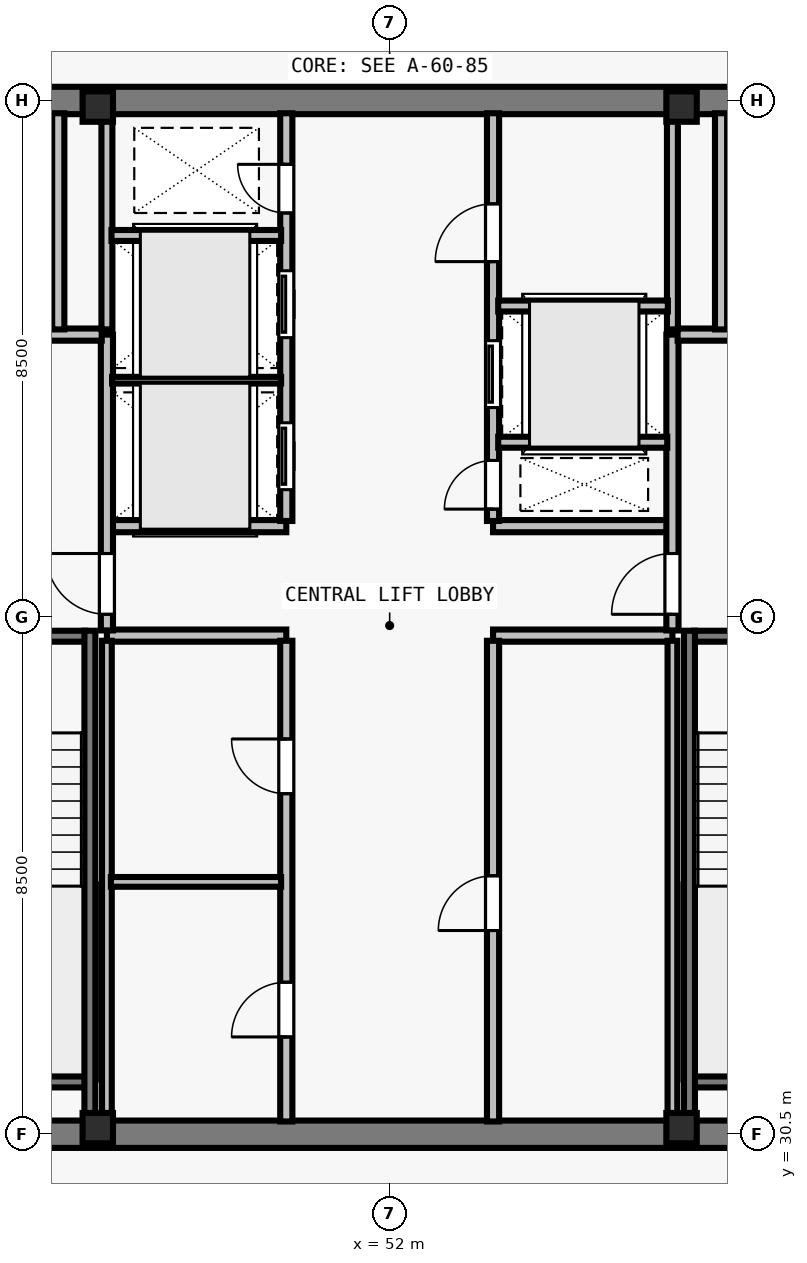
"""IFC4 building model, lengths in metres.
Left out: names, types, materials, properties, quantities, classifications, styles, units other than length and angle.
Written with IfcOpenShell. Run it as: python <this file> out.ifc"""

import sys

from ifc_helpers import new_model, si_unit, direction, frame, frame_2d, origin, origin_2d, place, context, subcontext, project, spatial, rectangle, i_section, extrude, element, fill, save


model = new_model("IFC4")
c1 = context("Model", 3, precision=1e-05, world=origin(), true_north=direction((0.0, 1.0)))
c2 = subcontext(c1, "Body", "Model", "MODEL_VIEW")
j1 = project(units=[si_unit("LENGTHUNIT", "METRE"), si_unit("PLANEANGLEUNIT", "RADIAN")], contexts=[c1])
p1 = place(None, origin())
s1 = spatial("IfcSite", under=j1, at=p1, CompositionType="ELEMENT")
p2 = place(p1, origin())
s2 = spatial("IfcBuilding", under=s1, at=p2, CompositionType="ELEMENT")
p3 = place(p2, frame((0.0, 0.0, 298.0)))
s3 = spatial("IfcBuildingStorey", under=s2, at=p3, CompositionType="ELEMENT", Elevation=298.0)
for number, where, z_axis, x_axis in (
    (1, (47.2, 30.6, 0.0), (0.0, 0.0, 1.0), (1.0, 0.0, 0.0)),
    (2, (56.8, 30.6, 0.0), (0.0, 0.0, 1.0), (1.0, 0.0, 0.0)),
    (3, (47.2, 47.4, 0.0), (0.0, 0.0, 1.0), (1.0, 0.0, 0.0)),
    (4, (56.8, 47.4, 0.0), (0.0, 0.0, 1.0), (1.0, 0.0, 0.0)),
):
    element("IfcColumn", number, at=place(p3, frame(where, z_axis=z_axis, x_axis=x_axis)), inside=s3, PredefinedType="COLUMN", context=c2, shape_type="SweptSolid", body=[
        extrude(i_section(OverallWidth=0.5, OverallDepth=0.5, WebThickness=0.028, FlangeThickness=0.045, at=origin_2d()), origin(), (0.0, 0.0, 1.0), 3.5),
    ])
for number, where, z_axis, x_axis in (
    (5, (43.275, 30.5, 0.0), (0.0, 0.0, 1.0), (1.0, 0.0, 0.0)),
    (6, (43.275, 47.5, 0.0), (0.0, 0.0, 1.0), (1.0, 0.0, 0.0)),
):
    element("IfcWall", number, at=place(p3, frame(where, z_axis=z_axis, x_axis=x_axis)), inside=s3, PredefinedType="SHEAR", context=c2, shape_type="SweptSolid", body=[
        extrude(rectangle(XDim=17.45, YDim=0.45, at=frame_2d((8.725, 0.0))), origin(), (0.0, 0.0, 1.0), 3.29),
    ])
for number, where, z_axis, x_axis in (
    (7, (47.35, 38.7, 0.0), (0.0, 0.0, 1.0), (1.0, 0.0, 0.0)),
    (8, (47.35, 40.5, 0.0), (0.0, 0.0, 1.0), (1.0, 0.0, 0.0)),
    (9, (53.7, 38.7, 0.0), (0.0, 0.0, 1.0), (1.0, 0.0, 0.0)),
    (10, (53.7, 40.5, 0.0), (0.0, 0.0, 1.0), (1.0, 0.0, 0.0)),
):
    element("IfcWall", number, at=place(p3, frame(where, z_axis=z_axis, x_axis=x_axis)), inside=s3, PredefinedType="SOLIDWALL", context=c2, shape_type="SweptSolid", body=[
        extrude(rectangle(XDim=2.95, YDim=0.2, at=frame_2d((1.475, 0.0))), origin(), (0.0, 0.0, 1.0), 3.29),
    ])
p4 = place(p3, frame((50.3, 30.71, 0.0), z_axis=(0.0, 0.0, 1.0), x_axis=(0.0, 1.0, 0.0)))
e11 = element("IfcWall", 11, at=p4, inside=s3, PredefinedType="SOLIDWALL", context=c2, shape_type="SweptSolid", body=[
    extrude(rectangle(XDim=7.905, YDim=0.2, at=frame_2d((3.953, 0.0))), origin(), (0.0, 0.0, 1.0), 3.29),
])
p5 = place(p4, frame((1.39, 0.0, 0.0)))
e12 = element("IfcOpeningElement", 12, at=p5, cuts=e11, PredefinedType="OPENING", context=c2, shape_type="SweptSolid", body=[
    extrude(rectangle(XDim=0.9, YDim=2.12, at=frame_2d((0.45, 1.06))), frame((0.0, 0.11, 0.0), z_axis=(0.0, -1.0, 0.0), x_axis=(1.0, 0.0, 0.0)), (0.0, 0.0, 1.0), 0.22),
])
p6 = place(p4, frame((5.39, 0.0, 0.0)))
e13 = element("IfcOpeningElement", 13, at=p6, cuts=e11, PredefinedType="OPENING", context=c2, shape_type="SweptSolid", body=[
    extrude(rectangle(XDim=0.9, YDim=2.12, at=frame_2d((0.45, 1.06))), frame((0.0, 0.11, 0.0), z_axis=(0.0, -1.0, 0.0), x_axis=(1.0, 0.0, 0.0)), (0.0, 0.0, 1.0), 0.22),
])
p7 = place(p3, frame((53.7, 30.71, 0.0), z_axis=(0.0, 0.0, 1.0), x_axis=(0.0, 1.0, 0.0)))
e14 = element("IfcWall", 14, at=p7, inside=s3, PredefinedType="SOLIDWALL", context=c2, shape_type="SweptSolid", body=[
    extrude(rectangle(XDim=7.905, YDim=0.2, at=frame_2d((3.953, 0.0))), origin(), (0.0, 0.0, 1.0), 3.29),
])
p8 = place(p7, frame((3.14, 0.0, 0.0)))
e15 = element("IfcOpeningElement", 15, at=p8, cuts=e14, PredefinedType="OPENING", context=c2, shape_type="SweptSolid", body=[
    extrude(rectangle(XDim=0.9, YDim=2.12, at=frame_2d((0.45, 1.06))), frame((0.0, 0.11, 0.0), z_axis=(0.0, -1.0, 0.0), x_axis=(1.0, 0.0, 0.0)), (0.0, 0.0, 1.0), 0.22),
])
p9 = place(p3, frame((50.3, 40.585, 0.0), z_axis=(0.0, 0.0, 1.0), x_axis=(0.0, 1.0, 0.0)))
e16 = element("IfcWall", 16, at=p9, inside=s3, PredefinedType="SOLIDWALL", context=c2, shape_type="SweptSolid", body=[
    extrude(rectangle(XDim=6.705, YDim=0.2, at=frame_2d((3.353, 0.0))), origin(), (0.0, 0.0, 1.0), 3.29),
])
p10 = place(p9, frame((0.515, 0.0, 0.0)))
e17 = element("IfcOpeningElement", 17, at=p10, cuts=e16, PredefinedType="OPENING", context=c2, shape_type="SweptSolid", body=[
    extrude(rectangle(XDim=1.1, YDim=2.2, at=frame_2d((0.55, 1.1))), frame((0.0, 0.11, 0.0), z_axis=(0.0, -1.0, 0.0), x_axis=(1.0, 0.0, 0.0)), (0.0, 0.0, 1.0), 0.22),
])
p11 = place(p9, frame((3.015, 0.0, 0.0)))
e18 = element("IfcOpeningElement", 18, at=p11, cuts=e16, PredefinedType="OPENING", context=c2, shape_type="SweptSolid", body=[
    extrude(rectangle(XDim=1.1, YDim=2.2, at=frame_2d((0.55, 1.1))), frame((0.0, 0.11, 0.0), z_axis=(0.0, -1.0, 0.0), x_axis=(1.0, 0.0, 0.0)), (0.0, 0.0, 1.0), 0.22),
])
p12 = place(p9, frame((5.065, 0.0, 0.0)))
e19 = element("IfcOpeningElement", 19, at=p12, cuts=e16, PredefinedType="OPENING", context=c2, shape_type="SweptSolid", body=[
    extrude(rectangle(XDim=0.8, YDim=2.08, at=frame_2d((0.4, 1.04))), frame((0.0, 0.11, 0.0), z_axis=(0.0, -1.0, 0.0), x_axis=(1.0, 0.0, 0.0)), (0.0, 0.0, 1.0), 0.22),
])
p13 = place(p3, frame((53.7, 40.585, 0.0), z_axis=(0.0, 0.0, 1.0), x_axis=(0.0, 1.0, 0.0)))
e20 = element("IfcWall", 20, at=p13, inside=s3, PredefinedType="SOLIDWALL", context=c2, shape_type="SweptSolid", body=[
    extrude(rectangle(XDim=6.705, YDim=0.2, at=frame_2d((3.353, 0.0))), origin(), (0.0, 0.0, 1.0), 3.29),
])
p14 = place(p13, frame((0.195, 0.0, 0.0)))
e21 = element("IfcOpeningElement", 21, at=p14, cuts=e20, PredefinedType="OPENING", context=c2, shape_type="SweptSolid", body=[
    extrude(rectangle(XDim=0.8, YDim=2.08, at=frame_2d((0.4, 1.04))), frame((0.0, 0.11, 0.0), z_axis=(0.0, -1.0, 0.0), x_axis=(1.0, 0.0, 0.0)), (0.0, 0.0, 1.0), 0.22),
])
p15 = place(p13, frame((1.865, 0.0, 0.0)))
e22 = element("IfcOpeningElement", 22, at=p15, cuts=e20, PredefinedType="OPENING", context=c2, shape_type="SweptSolid", body=[
    extrude(rectangle(XDim=1.1, YDim=2.2, at=frame_2d((0.55, 1.1))), frame((0.0, 0.11, 0.0), z_axis=(0.0, -1.0, 0.0), x_axis=(1.0, 0.0, 0.0)), (0.0, 0.0, 1.0), 0.22),
])
p16 = place(p13, frame((4.265, 0.0, 0.0)))
e23 = element("IfcOpeningElement", 23, at=p16, cuts=e20, PredefinedType="OPENING", context=c2, shape_type="SweptSolid", body=[
    extrude(rectangle(XDim=0.95, YDim=2.12, at=frame_2d((0.475, 1.06))), frame((0.0, 0.11, 0.0), z_axis=(0.0, -1.0, 0.0), x_axis=(1.0, 0.0, 0.0)), (0.0, 0.0, 1.0), 0.22),
])
p17 = place(p3, frame((47.35, 38.785, 0.0), z_axis=(0.0, 0.0, 1.0), x_axis=(0.0, 1.0, 0.0)))
e24 = element("IfcWall", 24, at=p17, inside=s3, PredefinedType="SOLIDWALL", context=c2, shape_type="SweptSolid", body=[
    extrude(rectangle(XDim=4.865, YDim=0.2, at=frame_2d((2.433, 0.0))), origin(), (0.0, 0.0, 1.0), 3.29),
])
p18 = place(p17, frame((0.265, 0.0, 0.0)))
e25 = element("IfcOpeningElement", 25, at=p18, cuts=e24, PredefinedType="OPENING", context=c2, shape_type="SweptSolid", body=[
    extrude(rectangle(XDim=1.0, YDim=2.15, at=frame_2d((0.5, 1.075))), frame((0.0, 0.11, 0.0), z_axis=(0.0, -1.0, 0.0), x_axis=(1.0, 0.0, 0.0)), (0.0, 0.0, 1.0), 0.22),
])
p19 = place(p3, frame((43.71, 43.65, 0.0), z_axis=(0.0, 0.0, 1.0), x_axis=(1.0, 0.0, 0.0)))
e26 = element("IfcWall", 26, at=p19, inside=s3, PredefinedType="SOLIDWALL", context=c2, shape_type="SweptSolid", body=[
    extrude(rectangle(XDim=3.555, YDim=0.2, at=frame_2d((1.777, 0.0))), origin(), (0.0, 0.0, 1.0), 3.29),
])
p20 = place(p19, frame((1.16, 0.0, 0.0)))
e27 = element("IfcOpeningElement", 27, at=p20, cuts=e26, PredefinedType="OPENING", context=c2, shape_type="SweptSolid", body=[
    extrude(rectangle(XDim=1.1, YDim=2.2, at=frame_2d((0.55, 1.1))), frame((0.0, 0.11, 0.0), z_axis=(0.0, -1.0, 0.0), x_axis=(1.0, 0.0, 0.0)), (0.0, 0.0, 1.0), 0.22),
])
p21 = place(p3, frame((46.55, 43.735, 0.0), z_axis=(0.0, 0.0, 1.0), x_axis=(0.0, 1.0, 0.0)))
e28 = element("IfcWall", 28, at=p21, inside=s3, PredefinedType="SOLIDWALL", context=c2, shape_type="SweptSolid", body=[
    extrude(rectangle(XDim=3.555, YDim=0.2, at=frame_2d((1.777, 0.0))), origin(), (0.0, 0.0, 1.0), 3.29),
])
p22 = place(p3, frame((56.65, 38.785, 0.0), z_axis=(0.0, 0.0, 1.0), x_axis=(0.0, 1.0, 0.0)))
e29 = element("IfcWall", 29, at=p22, inside=s3, PredefinedType="SOLIDWALL", context=c2, shape_type="SweptSolid", body=[
    extrude(rectangle(XDim=4.865, YDim=0.2, at=frame_2d((2.433, 0.0))), origin(), (0.0, 0.0, 1.0), 3.29),
])
p23 = place(p22, frame((0.265, 0.0, 0.0)))
e30 = element("IfcOpeningElement", 30, at=p23, cuts=e29, PredefinedType="OPENING", context=c2, shape_type="SweptSolid", body=[
    extrude(rectangle(XDim=1.0, YDim=2.15, at=frame_2d((0.5, 1.075))), frame((0.0, 0.11, 0.0), z_axis=(0.0, -1.0, 0.0), x_axis=(1.0, 0.0, 0.0)), (0.0, 0.0, 1.0), 0.22),
])
p24 = place(p3, frame((56.735, 43.65, 0.0), z_axis=(0.0, 0.0, 1.0), x_axis=(1.0, 0.0, 0.0)))
e31 = element("IfcWall", 31, at=p24, inside=s3, PredefinedType="SOLIDWALL", context=c2, shape_type="SweptSolid", body=[
    extrude(rectangle(XDim=3.555, YDim=0.2, at=frame_2d((1.777, 0.0))), origin(), (0.0, 0.0, 1.0), 3.29),
])
p25 = place(p24, frame((1.295, 0.0, 0.0)))
e32 = element("IfcOpeningElement", 32, at=p25, cuts=e31, PredefinedType="OPENING", context=c2, shape_type="SweptSolid", body=[
    extrude(rectangle(XDim=1.1, YDim=2.2, at=frame_2d((0.55, 1.1))), frame((0.0, 0.11, 0.0), z_axis=(0.0, -1.0, 0.0), x_axis=(1.0, 0.0, 0.0)), (0.0, 0.0, 1.0), 0.22),
])
p26 = place(p3, frame((57.45, 43.735, 0.0), z_axis=(0.0, 0.0, 1.0), x_axis=(0.0, 1.0, 0.0)))
e33 = element("IfcWall", 33, at=p26, inside=s3, PredefinedType="SOLIDWALL", context=c2, shape_type="SweptSolid", body=[
    extrude(rectangle(XDim=3.555, YDim=0.2, at=frame_2d((1.777, 0.0))), origin(), (0.0, 0.0, 1.0), 3.29),
])
p27 = place(p3, frame((47.35, 30.71, 0.0), z_axis=(0.0, 0.0, 1.0), x_axis=(0.0, 1.0, 0.0)))
e34 = element("IfcWall", 34, at=p27, inside=s3, PredefinedType="PARTITIONING", context=c2, shape_type="SweptSolid", body=[
    extrude(rectangle(XDim=7.905, YDim=0.16, at=frame_2d((3.953, 0.0))), origin(), (0.0, 0.0, 1.0), 3.29),
])
p28 = place(p3, frame((47.415, 34.65, 0.0), z_axis=(0.0, 0.0, 1.0), x_axis=(1.0, 0.0, 0.0)))
e35 = element("IfcWall", 35, at=p28, inside=s3, PredefinedType="PARTITIONING", context=c2, shape_type="SweptSolid", body=[
    extrude(rectangle(XDim=2.8, YDim=0.16, at=frame_2d((1.4, 0.0))), origin(), (0.0, 0.0, 1.0), 3.29),
])
p29 = place(p3, frame((56.65, 30.71, 0.0), z_axis=(0.0, 0.0, 1.0), x_axis=(0.0, 1.0, 0.0)))
e36 = element("IfcWall", 36, at=p29, inside=s3, PredefinedType="PARTITIONING", context=c2, shape_type="SweptSolid", body=[
    extrude(rectangle(XDim=7.905, YDim=0.16, at=frame_2d((3.953, 0.0))), origin(), (0.0, 0.0, 1.0), 3.29),
])
p30 = place(p3, frame((47.35, 43.735, 0.0), z_axis=(0.0, 0.0, 1.0), x_axis=(0.0, 1.0, 0.0)))
e37 = element("IfcWall", 37, at=p30, inside=s3, PredefinedType="SOLIDWALL", context=c2, shape_type="SweptSolid", body=[
    extrude(rectangle(XDim=3.555, YDim=0.18, at=frame_2d((1.777, 0.0))), origin(), (0.0, 0.0, 1.0), 3.29),
])
p31 = place(p3, frame((47.435, 42.9, 0.0), z_axis=(0.0, 0.0, 1.0), x_axis=(1.0, 0.0, 0.0)))
e38 = element("IfcWall", 38, at=p31, inside=s3, PredefinedType="PARTITIONING", context=c2, shape_type="SweptSolid", body=[
    extrude(rectangle(XDim=2.78, YDim=0.11, at=frame_2d((1.39, 0.0))), origin(), (0.0, 0.0, 1.0), 3.29),
])
p32 = place(p3, frame((47.425, 45.28, 0.0), z_axis=(0.0, 0.0, 1.0), x_axis=(1.0, 0.0, 0.0)))
e39 = element("IfcWall", 39, at=p32, inside=s3, PredefinedType="SOLIDWALL", context=c2, shape_type="SweptSolid", body=[
    extrude(rectangle(XDim=2.79, YDim=0.18, at=frame_2d((1.395, 0.0))), origin(), (0.0, 0.0, 1.0), 3.29),
])
p33 = place(p3, frame((56.65, 43.735, 0.0), z_axis=(0.0, 0.0, 1.0), x_axis=(0.0, 1.0, 0.0)))
e40 = element("IfcWall", 40, at=p33, inside=s3, PredefinedType="SOLIDWALL", context=c2, shape_type="SweptSolid", body=[
    extrude(rectangle(XDim=3.555, YDim=0.18, at=frame_2d((1.777, 0.0))), origin(), (0.0, 0.0, 1.0), 3.29),
])
p34 = place(p3, frame((53.785, 41.88, 0.0), z_axis=(0.0, 0.0, 1.0), x_axis=(1.0, 0.0, 0.0)))
e41 = element("IfcWall", 41, at=p34, inside=s3, PredefinedType="SOLIDWALL", context=c2, shape_type="SweptSolid", body=[
    extrude(rectangle(XDim=2.78, YDim=0.18, at=frame_2d((1.39, 0.0))), origin(), (0.0, 0.0, 1.0), 3.29),
])
p35 = place(p3, frame((53.785, 44.12, 0.0), z_axis=(0.0, 0.0, 1.0), x_axis=(1.0, 0.0, 0.0)))
e42 = element("IfcWall", 42, at=p35, inside=s3, PredefinedType="SOLIDWALL", context=c2, shape_type="SweptSolid", body=[
    extrude(rectangle(XDim=2.79, YDim=0.18, at=frame_2d((1.395, 0.0))), origin(), (0.0, 0.0, 1.0), 3.29),
])
p36 = place(p3, frame((43.715, 38.69, 0.0), z_axis=(0.0, 0.0, 1.0), x_axis=(1.0, 0.0, 0.0)))
e43 = element("IfcWall", 43, at=p36, inside=s3, PredefinedType="SOLIDWALL", context=c2, shape_type="SweptSolid", body=[
    extrude(rectangle(XDim=3.28, YDim=0.18, at=frame_2d((1.64, 0.0))), origin(), (0.0, 0.0, 1.0), 3.29),
])
p37 = place(p36, frame((1.165, 0.0, 0.0)))
e44 = element("IfcOpeningElement", 44, at=p37, cuts=e43, PredefinedType="OPENING", context=c2, shape_type="SweptSolid", body=[
    extrude(rectangle(XDim=0.95, YDim=2.15, at=frame_2d((0.475, 1.075))), frame((0.0, 0.1, 0.0), z_axis=(0.0, -1.0, 0.0), x_axis=(1.0, 0.0, 0.0)), (0.0, 0.0, 1.0), 0.2),
])
p38 = place(p3, frame((43.715, 31.36, 0.0), z_axis=(0.0, 0.0, 1.0), x_axis=(1.0, 0.0, 0.0)))
e45 = element("IfcWall", 45, at=p38, inside=s3, PredefinedType="SOLIDWALL", context=c2, shape_type="SweptSolid", body=[
    extrude(rectangle(XDim=3.28, YDim=0.18, at=frame_2d((1.64, 0.0))), origin(), (0.0, 0.0, 1.0), 3.29),
])
p39 = place(p3, frame((47.07, 38.78, 0.0), z_axis=(0.0, 0.0, 1.0), x_axis=(0.0, -1.0, 0.0)))
e46 = element("IfcWall", 46, at=p39, inside=s3, PredefinedType="SOLIDWALL", context=c2, shape_type="SweptSolid", body=[
    extrude(rectangle(XDim=8.067, YDim=0.18, at=frame_2d((4.034, 0.0))), origin(), (0.0, 0.0, 1.0), 3.29),
])
p40 = place(p3, frame((57.005, 38.69, 0.0), z_axis=(0.0, 0.0, 1.0), x_axis=(1.0, 0.0, 0.0)))
e47 = element("IfcWall", 47, at=p40, inside=s3, PredefinedType="SOLIDWALL", context=c2, shape_type="SweptSolid", body=[
    extrude(rectangle(XDim=3.28, YDim=0.18, at=frame_2d((1.64, 0.0))), origin(), (0.0, 0.0, 1.0), 3.29),
])
p41 = place(p40, frame((1.165, 0.0, 0.0)))
e48 = element("IfcOpeningElement", 48, at=p41, cuts=e47, PredefinedType="OPENING", context=c2, shape_type="SweptSolid", body=[
    extrude(rectangle(XDim=0.95, YDim=2.15, at=frame_2d((0.475, 1.075))), frame((0.0, 0.1, 0.0), z_axis=(0.0, -1.0, 0.0), x_axis=(1.0, 0.0, 0.0)), (0.0, 0.0, 1.0), 0.2),
])
p42 = place(p3, frame((57.005, 31.36, 0.0), z_axis=(0.0, 0.0, 1.0), x_axis=(1.0, 0.0, 0.0)))
e49 = element("IfcWall", 49, at=p42, inside=s3, PredefinedType="SOLIDWALL", context=c2, shape_type="SweptSolid", body=[
    extrude(rectangle(XDim=3.28, YDim=0.18, at=frame_2d((1.64, 0.0))), origin(), (0.0, 0.0, 1.0), 3.29),
])
p43 = place(p3, frame((56.93, 38.78, 0.0), z_axis=(0.0, 0.0, 1.0), x_axis=(0.0, -1.0, 0.0)))
e50 = element("IfcWall", 50, at=p43, inside=s3, PredefinedType="SOLIDWALL", context=c2, shape_type="SweptSolid", body=[
    extrude(rectangle(XDim=8.067, YDim=0.18, at=frame_2d((4.034, 0.0))), origin(), (0.0, 0.0, 1.0), 3.29),
])
p44 = place(p18, origin())
e51 = element("IfcDoor", 51, at=p44, inside=s3, OperationType="SINGLE_SWING_RIGHT", PredefinedType="DOOR", context=c2, shape_type="SweptSolid", body=[
    extrude(rectangle(XDim=1.0, YDim=2.15, at=frame_2d((0.5, 1.075))), frame((0.0, 0.025, 0.0), z_axis=(0.0, -1.0, 0.0), x_axis=(1.0, 0.0, 0.0)), (0.0, 0.0, 1.0), 0.05),
])
fill(e25, e51)
p45 = place(p23, origin())
e52 = element("IfcDoor", 52, at=p45, inside=s3, OperationType="SINGLE_SWING_LEFT", PredefinedType="DOOR", context=c2, shape_type="SweptSolid", body=[
    extrude(rectangle(XDim=1.0, YDim=2.15, at=frame_2d((0.5, 1.075))), frame((0.0, 0.025, 0.0), z_axis=(0.0, -1.0, 0.0), x_axis=(1.0, 0.0, 0.0)), (0.0, 0.0, 1.0), 0.05),
])
fill(e30, e52)
p46 = place(p5, origin())
e53 = element("IfcDoor", 53, at=p46, inside=s3, OperationType="SINGLE_SWING_LEFT", PredefinedType="DOOR", context=c2, shape_type="SweptSolid", body=[
    extrude(rectangle(XDim=0.9, YDim=2.12, at=frame_2d((0.45, 1.06))), frame((0.0, 0.025, 0.0), z_axis=(0.0, -1.0, 0.0), x_axis=(1.0, 0.0, 0.0)), (0.0, 0.0, 1.0), 0.05),
])
fill(e12, e53)
p47 = place(p6, origin())
e54 = element("IfcDoor", 54, at=p47, inside=s3, OperationType="SINGLE_SWING_RIGHT", PredefinedType="DOOR", context=c2, shape_type="SweptSolid", body=[
    extrude(rectangle(XDim=0.9, YDim=2.12, at=frame_2d((0.45, 1.06))), frame((0.0, 0.025, 0.0), z_axis=(0.0, -1.0, 0.0), x_axis=(1.0, 0.0, 0.0)), (0.0, 0.0, 1.0), 0.05),
])
fill(e13, e54)
p48 = place(p8, origin())
e55 = element("IfcDoor", 55, at=p48, inside=s3, OperationType="SINGLE_SWING_LEFT", PredefinedType="DOOR", context=c2, shape_type="SweptSolid", body=[
    extrude(rectangle(XDim=0.9, YDim=2.12, at=frame_2d((0.45, 1.06))), frame((0.0, 0.025, 0.0), z_axis=(0.0, -1.0, 0.0), x_axis=(1.0, 0.0, 0.0)), (0.0, 0.0, 1.0), 0.05),
])
fill(e15, e55)
p49 = place(p10, origin())
e56 = element("IfcDoor", 56, at=p49, inside=s3, OperationType="SLIDING_TO_LEFT", PredefinedType="DOOR", context=c2, shape_type="SweptSolid", body=[
    extrude(rectangle(XDim=1.1, YDim=2.2, at=frame_2d((0.55, 1.1))), frame((0.0, 0.025, 0.0), z_axis=(0.0, -1.0, 0.0), x_axis=(1.0, 0.0, 0.0)), (0.0, 0.0, 1.0), 0.05),
])
fill(e17, e56)
p50 = place(p11, origin())
e57 = element("IfcDoor", 57, at=p50, inside=s3, OperationType="SLIDING_TO_LEFT", PredefinedType="DOOR", context=c2, shape_type="SweptSolid", body=[
    extrude(rectangle(XDim=1.1, YDim=2.2, at=frame_2d((0.55, 1.1))), frame((0.0, 0.025, 0.0), z_axis=(0.0, -1.0, 0.0), x_axis=(1.0, 0.0, 0.0)), (0.0, 0.0, 1.0), 0.05),
])
fill(e18, e57)
p51 = place(p12, origin())
e58 = element("IfcDoor", 58, at=p51, inside=s3, OperationType="SINGLE_SWING_RIGHT", PredefinedType="DOOR", context=c2, shape_type="SweptSolid", body=[
    extrude(rectangle(XDim=0.8, YDim=2.08, at=frame_2d((0.4, 1.04))), frame((0.0, 0.025, 0.0), z_axis=(0.0, -1.0, 0.0), x_axis=(1.0, 0.0, 0.0)), (0.0, 0.0, 1.0), 0.05),
])
fill(e19, e58)
p52 = place(p14, origin())
e59 = element("IfcDoor", 59, at=p52, inside=s3, OperationType="SINGLE_SWING_LEFT", PredefinedType="DOOR", context=c2, shape_type="SweptSolid", body=[
    extrude(rectangle(XDim=0.8, YDim=2.08, at=frame_2d((0.4, 1.04))), frame((0.0, 0.025, 0.0), z_axis=(0.0, -1.0, 0.0), x_axis=(1.0, 0.0, 0.0)), (0.0, 0.0, 1.0), 0.05),
])
fill(e21, e59)
p53 = place(p15, origin())
e60 = element("IfcDoor", 60, at=p53, inside=s3, OperationType="SLIDING_TO_LEFT", PredefinedType="DOOR", context=c2, shape_type="SweptSolid", body=[
    extrude(rectangle(XDim=1.1, YDim=2.2, at=frame_2d((0.55, 1.1))), frame((0.0, 0.025, 0.0), z_axis=(0.0, -1.0, 0.0), x_axis=(1.0, 0.0, 0.0)), (0.0, 0.0, 1.0), 0.05),
])
fill(e22, e60)
p54 = place(p16, origin())
e61 = element("IfcDoor", 61, at=p54, inside=s3, OperationType="SINGLE_SWING_LEFT", PredefinedType="DOOR", context=c2, shape_type="SweptSolid", body=[
    extrude(rectangle(XDim=0.95, YDim=2.12, at=frame_2d((0.475, 1.06))), frame((0.0, 0.025, 0.0), z_axis=(0.0, -1.0, 0.0), x_axis=(1.0, 0.0, 0.0)), (0.0, 0.0, 1.0), 0.05),
])
fill(e23, e61)
save(model, sys.argv[1])
